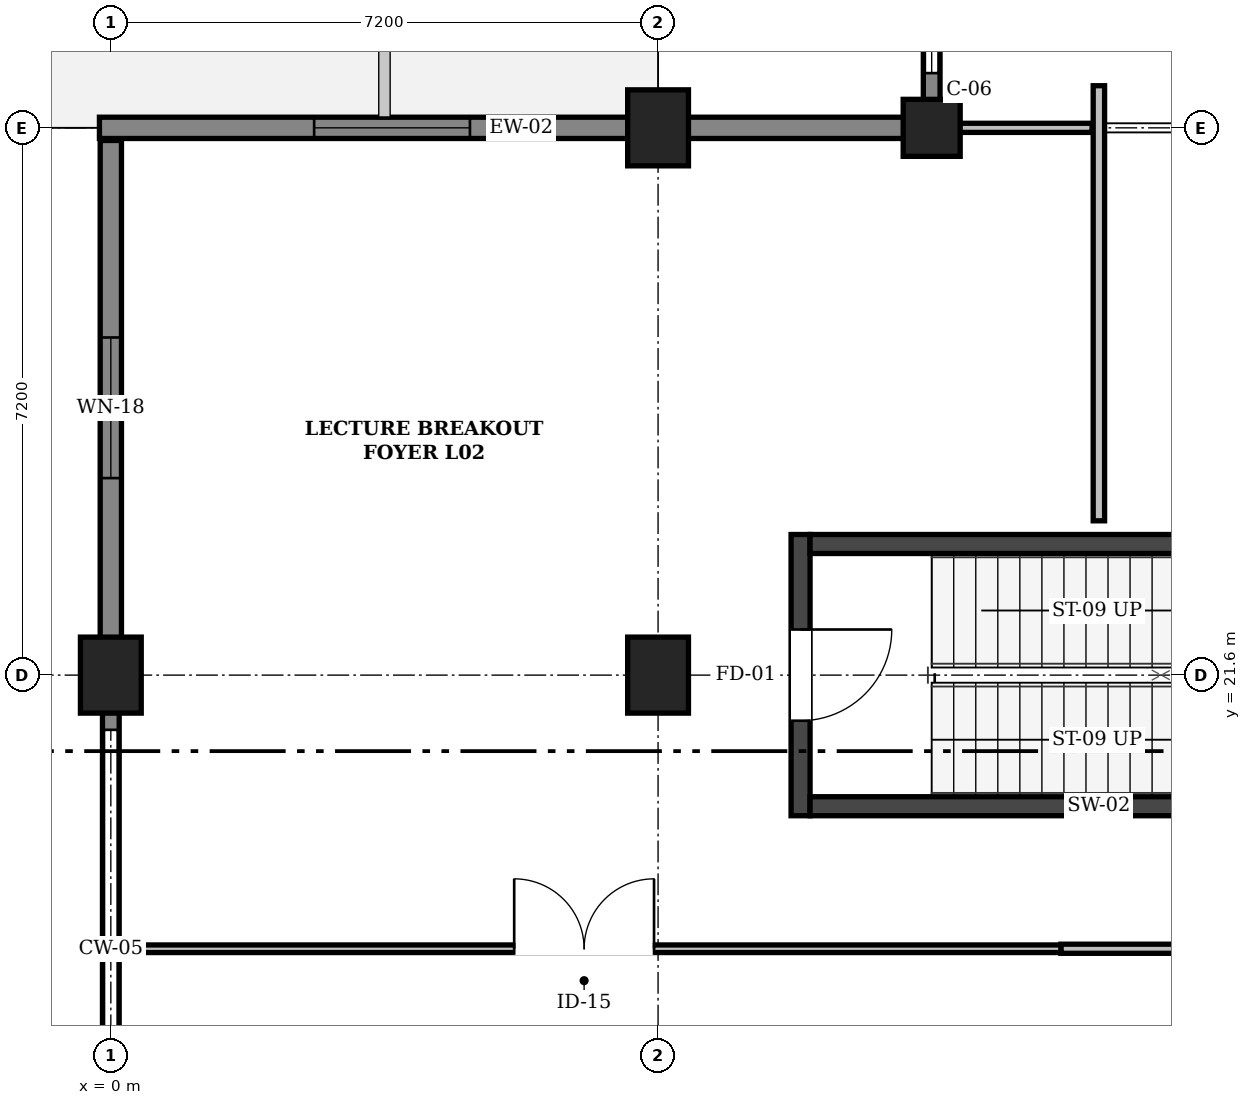
"""IFC4 building model, lengths in metres.
Left out: names, types, materials, properties, quantities, classifications, styles, units other than length and angle.
Written with IfcOpenShell. Run it as: python <this file> out.ifc"""

import sys

from ifc_helpers import new_model, si_unit, direction, frame, frame_2d, origin, origin_2d, place, context, subcontext, project, spatial, rectangle, extrude, element, fill, save


model = new_model("IFC4")
c1 = context("Model", 3, precision=1e-05, world=origin(), true_north=direction((0.0, 1.0)))
c2 = subcontext(c1, "Body", "Model", "MODEL_VIEW")
j1 = project(units=[si_unit("LENGTHUNIT", "METRE"), si_unit("PLANEANGLEUNIT", "RADIAN")], contexts=[c1])
p1 = place(None, origin())
s1 = spatial("IfcSite", under=j1, at=p1, CompositionType="ELEMENT")
p2 = place(p1, origin())
s2 = spatial("IfcBuilding", under=s1, at=p2, CompositionType="ELEMENT")
p3 = place(p2, frame((0.0, 0.0, 9.6)))
s3 = spatial("IfcBuildingStorey", under=s2, at=p3, CompositionType="ELEMENT", Elevation=9.6)
for number, where, z_axis, x_axis in (
    (1, (0.0, 21.6, 0.0), (0.0, 0.0, 1.0), (1.0, 0.0, 0.0)),
    (2, (7.2, 21.6, 0.0), (0.0, 0.0, 1.0), (1.0, 0.0, 0.0)),
    (3, (7.2, 28.8, 0.0), (0.0, 0.0, 1.0), (1.0, 0.0, 0.0)),
):
    element("IfcColumn", number, at=place(p3, frame(where, z_axis=z_axis, x_axis=x_axis)), inside=s3, PredefinedType="COLUMN", context=c2, shape_type="SweptSolid", body=[
        extrude(rectangle(XDim=0.8, YDim=1.0, at=origin_2d()), origin(), (0.0, 0.0, 1.0), 4.8),
    ])
p4 = place(p3, frame((10.8, 28.8, 0.0), z_axis=(0.0, 0.0, 1.0), x_axis=(1.0, 0.0, 0.0)))
e4 = element("IfcColumn", 4, at=p4, inside=s3, PredefinedType="COLUMN", context=c2, shape_type="SweptSolid", body=[
    extrude(rectangle(XDim=0.75, YDim=0.75, at=origin_2d()), origin(), (0.0, 0.0, 1.0), 4.8),
])
p5 = place(p3, frame((10.8, 28.966, 0.0), z_axis=(0.0, 0.0, 1.0), x_axis=(0.0, 1.0, 0.0)))
e5 = element("IfcWall", 5, at=p5, inside=s3, PredefinedType="SOLIDWALL", context=c2, shape_type="SweptSolid", body=[
    extrude(rectangle(XDim=7.034, YDim=0.22, at=frame_2d((3.517, 0.0))), origin(), (0.0, 0.0, 1.0), 1.24),
])
p6 = place(p3, frame((0.0, 14.4, 0.0), z_axis=(0.0, 0.0, 1.0), x_axis=(0.0, 1.0, 0.0)))
e6 = element("IfcWall", 6, at=p6, inside=s3, PredefinedType="SOLIDWALL", context=c2, shape_type="SweptSolid", body=[
    extrude(rectangle(XDim=7.2, YDim=0.22, at=frame_2d((3.6, 0.0))), origin(), (0.0, 0.0, 1.0), 1.24),
])
p7 = place(p3, frame((0.0, 21.6, 0.0), z_axis=(0.0, 0.0, 1.0), x_axis=(0.0, 1.0, 0.0)))
e7 = element("IfcWall", 7, at=p7, inside=s3, PredefinedType="SOLIDWALL", context=c2, shape_type="SweptSolid", body=[
    extrude(rectangle(XDim=7.034, YDim=0.28, at=frame_2d((3.517, 0.0))), origin(), (0.0, 0.0, 1.0), 4.52),
])
p8 = place(p7, frame((2.592, 0.0, 0.95)))
e8 = element("IfcOpeningElement", 8, at=p8, cuts=e7, PredefinedType="OPENING", context=c2, shape_type="SweptSolid", body=[
    extrude(rectangle(XDim=1.85, YDim=1.55, at=frame_2d((0.925, 0.775))), frame((0.0, 0.152, 0.0), z_axis=(0.0, -1.0, 0.0), x_axis=(1.0, 0.0, 0.0)), (0.0, 0.0, 1.0), 0.304),
])
p9 = place(p3, frame((-0.15, 28.8, 0.0), z_axis=(0.0, 0.0, 1.0), x_axis=(1.0, 0.0, 0.0)))
e9 = element("IfcWall", 9, at=p9, inside=s3, PredefinedType="SOLIDWALL", context=c2, shape_type="SweptSolid", body=[
    extrude(rectangle(XDim=7.35, YDim=0.28, at=frame_2d((3.675, 0.0))), origin(), (0.0, 0.0, 1.0), 4.52),
])
p10 = place(p9, frame((2.825, 0.0, 0.95)))
e10 = element("IfcOpeningElement", 10, at=p10, cuts=e9, PredefinedType="OPENING", context=c2, shape_type="SweptSolid", body=[
    extrude(rectangle(XDim=2.05, YDim=1.55, at=frame_2d((1.025, 0.775))), frame((0.0, 0.152, 0.0), z_axis=(0.0, -1.0, 0.0), x_axis=(1.0, 0.0, 0.0)), (0.0, 0.0, 1.0), 0.304),
])
p11 = place(p3, frame((7.2, 28.8, 0.0), z_axis=(0.0, 0.0, 1.0), x_axis=(1.0, 0.0, 0.0)))
e11 = element("IfcWall", 11, at=p11, inside=s3, PredefinedType="SOLIDWALL", context=c2, shape_type="SweptSolid", body=[
    extrude(rectangle(XDim=3.75, YDim=0.28, at=frame_2d((1.875, 0.0))), origin(), (0.0, 0.0, 1.0), 4.52),
])
p12 = place(p3, frame((9.075, 19.75, 0.0), z_axis=(0.0, 0.0, 1.0), x_axis=(0.0, 1.0, 0.0)))
e12 = element("IfcWall", 12, at=p12, inside=s3, PredefinedType="SHEAR", context=c2, shape_type="SweptSolid", body=[
    extrude(rectangle(XDim=3.7, YDim=0.25, at=frame_2d((1.85, 0.0))), origin(), (0.0, 0.0, 1.0), 4.55),
])
p13 = place(p12, frame((1.25, 0.0, 0.0)))
e13 = element("IfcOpeningElement", 13, at=p13, cuts=e12, PredefinedType="OPENING", context=c2, shape_type="SweptSolid", body=[
    extrude(rectangle(XDim=1.2, YDim=2.15, at=frame_2d((0.6, 1.075))), frame((0.0, 0.137, 0.0), z_axis=(0.0, -1.0, 0.0), x_axis=(1.0, 0.0, 0.0)), (0.0, 0.0, 1.0), 0.274),
])
for number, where, z_axis, x_axis in (
    (14, (9.2, 19.875, 0.0), (0.0, 0.0, 1.0), (1.0, 0.0, 0.0)),
    (15, (9.2, 23.325, 0.0), (0.0, 0.0, 1.0), (1.0, 0.0, 0.0)),
):
    element("IfcWall", number, at=place(p3, frame(where, z_axis=z_axis, x_axis=x_axis)), inside=s3, PredefinedType="SHEAR", context=c2, shape_type="SweptSolid", body=[
        extrude(rectangle(XDim=7.6, YDim=0.25, at=frame_2d((3.8, 0.0))), origin(), (0.0, 0.0, 1.0), 4.55),
    ])
p14 = place(p3, frame((12.5, 18.0, 0.0), z_axis=(0.0, 0.0, 1.0), x_axis=(1.0, 0.0, 0.0)))
e16 = element("IfcWall", 16, at=p14, inside=s3, PredefinedType="PARTITIONING", context=c2, shape_type="SweptSolid", body=[
    extrude(rectangle(XDim=9.01, YDim=0.12, at=frame_2d((4.505, 0.0))), origin(), (0.0, 0.0, 1.0), 4.46),
])
p15 = place(p3, frame((0.122, 18.0, 0.0), z_axis=(0.0, 0.0, 1.0), x_axis=(1.0, 0.0, 0.0)))
e17 = element("IfcWall", 17, at=p15, inside=s3, PredefinedType="PARTITIONING", context=c2, shape_type="SweptSolid", body=[
    extrude(rectangle(XDim=12.378, YDim=0.1, at=frame_2d((6.189, 0.0))), origin(), (0.0, 0.0, 1.0), 4.46),
])
p16 = place(p15, frame((5.185, 0.0, 0.0)))
e18 = element("IfcOpeningElement", 18, at=p16, cuts=e17, PredefinedType="OPENING", context=c2, shape_type="SweptSolid", body=[
    extrude(rectangle(XDim=1.84, YDim=2.3, at=frame_2d((0.92, 1.15))), frame((0.0, 0.062, 0.0), z_axis=(0.0, -1.0, 0.0), x_axis=(1.0, 0.0, 0.0)), (0.0, 0.0, 1.0), 0.124),
])
p17 = place(p3, frame((13.0, 23.63, 0.0), z_axis=(0.0, 0.0, 1.0), x_axis=(0.0, 1.0, 0.0)))
e19 = element("IfcWall", 19, at=p17, inside=s3, PredefinedType="PARTITIONING", context=c2, shape_type="SweptSolid", body=[
    extrude(rectangle(XDim=5.724, YDim=0.15, at=frame_2d((2.862, 0.0))), origin(), (0.0, 0.0, 1.0), 4.46),
])
p18 = place(p3, frame((10.962, 28.8, 0.0), z_axis=(0.0, 0.0, 1.0), x_axis=(1.0, 0.0, 0.0)))
e20 = element("IfcWall", 20, at=p18, inside=s3, PredefinedType="PARTITIONING", context=c2, shape_type="SweptSolid", body=[
    extrude(rectangle(XDim=1.948, YDim=0.12, at=frame_2d((0.974, 0.0))), origin(), (0.0, 0.0, 1.0), 3.93),
])
p19 = place(p8, origin())
e21 = element("IfcWindow", 21, at=p19, inside=s3, PartitioningType="SINGLE_PANEL", PredefinedType="WINDOW", context=c2, shape_type="SweptSolid", body=[
    extrude(rectangle(XDim=1.85, YDim=1.55, at=frame_2d((0.925, 0.775))), frame((0.0, 0.03, 0.0), z_axis=(0.0, -1.0, 0.0), x_axis=(1.0, 0.0, 0.0)), (0.0, 0.0, 1.0), 0.06),
])
fill(e8, e21)
p20 = place(p10, origin())
e22 = element("IfcWindow", 22, at=p20, inside=s3, PartitioningType="SINGLE_PANEL", PredefinedType="WINDOW", context=c2, shape_type="SweptSolid", body=[
    extrude(rectangle(XDim=2.05, YDim=1.55, at=frame_2d((1.025, 0.775))), frame((0.0, 0.03, 0.0), z_axis=(0.0, -1.0, 0.0), x_axis=(1.0, 0.0, 0.0)), (0.0, 0.0, 1.0), 0.06),
])
fill(e10, e22)
p21 = place(p13, frame((1.2, 0.0, 0.0), z_axis=(0.0, 0.0, 1.0), x_axis=(-1.0, 0.0, 0.0)))
e23 = element("IfcDoor", 23, at=p21, inside=s3, OperationType="SINGLE_SWING_LEFT", PredefinedType="DOOR", context=c2, shape_type="SweptSolid", body=[
    extrude(rectangle(XDim=1.2, YDim=2.15, at=frame_2d((0.6, 1.075))), frame((0.0, 0.025, 0.0), z_axis=(0.0, -1.0, 0.0), x_axis=(1.0, 0.0, 0.0)), (0.0, 0.0, 1.0), 0.05),
])
fill(e13, e23)
p22 = place(p16, origin())
e24 = element("IfcDoor", 24, at=p22, inside=s3, OperationType="DOUBLE_DOOR_SINGLE_SWING", PredefinedType="DOOR", context=c2, shape_type="SweptSolid", body=[
    extrude(rectangle(XDim=1.84, YDim=2.3, at=frame_2d((0.92, 1.15))), frame((0.0, 0.025, 0.0), z_axis=(0.0, -1.0, 0.0), x_axis=(1.0, 0.0, 0.0)), (0.0, 0.0, 1.0), 0.05),
])
fill(e18, e24)
save(model, sys.argv[1])
